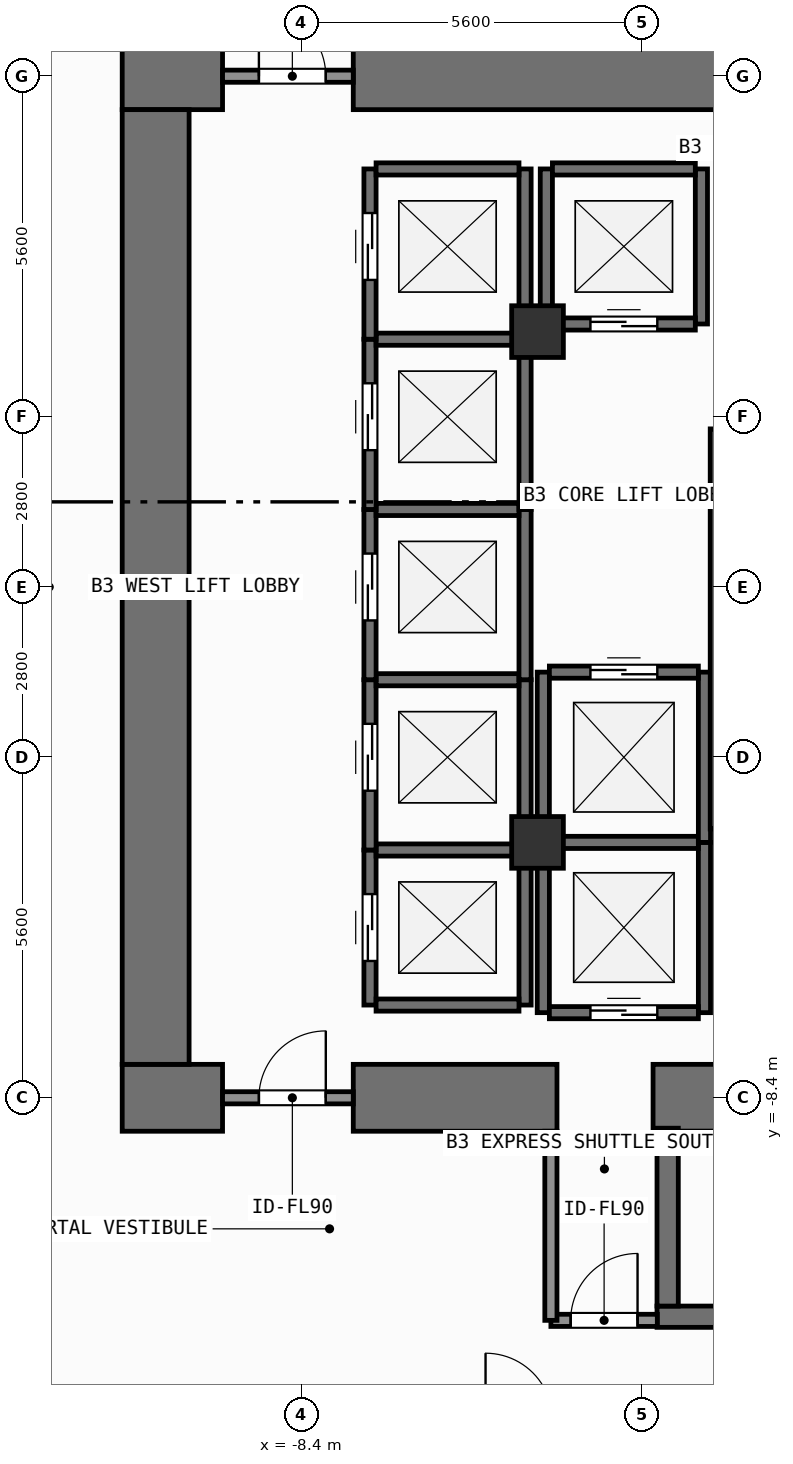
"""IFC4 building model, lengths in metres.
Left out: names, types, materials, properties, quantities, classifications, styles, units other than length and angle.
Written with IfcOpenShell. Run it as: python <this file> out.ifc"""

import sys

from ifc_helpers import new_model, si_unit, direction, frame, frame_2d, origin, origin_2d, place, context, subcontext, project, spatial, rectangle, extrude, element, fill, save


model = new_model("IFC4")
c1 = context("Model", 3, precision=1e-05, world=origin(), true_north=direction((0.0, 1.0)))
c2 = subcontext(c1, "Body", "Model", "MODEL_VIEW")
j1 = project(units=[si_unit("LENGTHUNIT", "METRE"), si_unit("PLANEANGLEUNIT", "RADIAN")], contexts=[c1])
p1 = place(None, origin())
s1 = spatial("IfcSite", under=j1, at=p1, CompositionType="ELEMENT")
p2 = place(p1, origin())
s2 = spatial("IfcBuilding", under=s1, at=p2, CompositionType="ELEMENT")
p3 = place(p2, frame((0.0, 0.0, -12.6)))
s3 = spatial("IfcBuildingStorey", under=s2, at=p3, CompositionType="ELEMENT", Elevation=-12.6)
p4 = place(p3, frame((-11.35, -8.4, 0.0), z_axis=(0.0, 0.0, 1.0), x_axis=(1.0, 0.0, 0.0)))
e1 = element("IfcWall", 1, at=p4, inside=s3, PredefinedType="SHEAR", context=c2, shape_type="SweptSolid", body=[
    extrude(rectangle(XDim=1.65, YDim=1.1, at=frame_2d((0.825, 0.0))), origin(), (0.0, 0.0, 1.0), 4.2),
])
p5 = place(p3, frame((-7.55, -8.4, 0.0), z_axis=(0.0, 0.0, 1.0), x_axis=(1.0, 0.0, 0.0)))
e2 = element("IfcWall", 2, at=p5, inside=s3, PredefinedType="SHEAR", context=c2, shape_type="SweptSolid", body=[
    extrude(rectangle(XDim=3.35, YDim=1.1, at=frame_2d((1.675, 0.0))), origin(), (0.0, 0.0, 1.0), 4.2),
])
p6 = place(p3, frame((-2.62, -8.4, 0.0), z_axis=(0.0, 0.0, 1.0), x_axis=(1.0, 0.0, 0.0)))
e3 = element("IfcWall", 3, at=p6, inside=s3, PredefinedType="SHEAR", context=c2, shape_type="SweptSolid", body=[
    extrude(rectangle(XDim=7.27, YDim=1.1, at=frame_2d((3.635, 0.0))), origin(), (0.0, 0.0, 1.0), 4.2),
])
p7 = place(p3, frame((-11.35, 8.4, 0.0), z_axis=(0.0, 0.0, 1.0), x_axis=(1.0, 0.0, 0.0)))
e4 = element("IfcWall", 4, at=p7, inside=s3, PredefinedType="SHEAR", context=c2, shape_type="SweptSolid", body=[
    extrude(rectangle(XDim=1.65, YDim=1.1, at=frame_2d((0.825, 0.0))), origin(), (0.0, 0.0, 1.0), 4.2),
])
p8 = place(p3, frame((-7.55, 8.4, 0.0), z_axis=(0.0, 0.0, 1.0), x_axis=(1.0, 0.0, 0.0)))
e5 = element("IfcWall", 5, at=p8, inside=s3, PredefinedType="SHEAR", context=c2, shape_type="SweptSolid", body=[
    extrude(rectangle(XDim=16.5, YDim=1.1, at=frame_2d((8.25, 0.0))), origin(), (0.0, 0.0, 1.0), 4.2),
])
p9 = place(p3, frame((-10.8, -7.85, 0.0), z_axis=(0.0, 0.0, 1.0), x_axis=(0.0, 1.0, 0.0)))
e6 = element("IfcWall", 6, at=p9, inside=s3, PredefinedType="SHEAR", context=c2, shape_type="SweptSolid", body=[
    extrude(rectangle(XDim=15.7, YDim=1.1, at=frame_2d((7.85, 0.0))), origin(), (0.0, 0.0, 1.0), 4.2),
])
p10 = place(p3, frame((-2.555, -12.0, 0.0), z_axis=(0.0, 0.0, 1.0), x_axis=(1.0, 0.0, 0.0)))
e7 = element("IfcWall", 7, at=p10, inside=s3, PredefinedType="SHEAR", context=c2, shape_type="SweptSolid", body=[
    extrude(rectangle(XDim=7.31, YDim=0.35, at=frame_2d((3.655, 0.0))), origin(), (0.0, 0.0, 1.0), 4.2),
])
p11 = place(p3, frame((-2.2, -8.988, 0.0), z_axis=(0.0, 0.0, 1.0), x_axis=(1.0, 0.0, 0.0)))
e8 = element("IfcWall", 8, at=p11, inside=s3, PredefinedType="SHEAR", context=c2, shape_type="SweptSolid", body=[
    extrude(rectangle(XDim=6.6, YDim=0.075, at=frame_2d((3.3, 0.0))), origin(), (0.0, 0.0, 1.0), 4.2),
])
p12 = place(p3, frame((-2.38, -11.825, 0.0), z_axis=(0.0, 0.0, 1.0), x_axis=(0.0, 1.0, 0.0)))
e9 = element("IfcWall", 9, at=p12, inside=s3, PredefinedType="SHEAR", context=c2, shape_type="SweptSolid", body=[
    extrude(rectangle(XDim=2.925, YDim=0.35, at=frame_2d((1.462, 0.0))), origin(), (0.0, 0.0, 1.0), 4.2),
])
for number, where, z_axis, x_axis in (
    (10, (-4.52, -4.2, 0.0), (0.0, 0.0, 1.0), (1.0, 0.0, 0.0)),
    (11, (-4.52, 4.2, 0.0), (0.0, 0.0, 1.0), (1.0, 0.0, 0.0)),
):
    element("IfcColumn", number, at=place(p3, frame(where, z_axis=z_axis, x_axis=x_axis)), inside=s3, PredefinedType="COLUMN", context=c2, shape_type="SweptSolid", body=[
        extrude(rectangle(XDim=0.85, YDim=0.85, at=origin_2d()), origin(), (0.0, 0.0, 1.0), 4.2),
    ])
p13 = place(p3, frame((-7.275, -6.875, 0.0), z_axis=(0.0, 0.0, 1.0), x_axis=(0.0, 1.0, 0.0)))
e12 = element("IfcWall", 12, at=p13, inside=s3, PredefinedType="SHEAR", context=c2, shape_type="SweptSolid", body=[
    extrude(rectangle(XDim=2.55, YDim=0.2, at=frame_2d((1.275, 0.0))), origin(), (0.0, 0.0, 1.0), 3.94),
])
p14 = place(p13, frame((0.725, 0.0, 0.0)))
e13 = element("IfcOpeningElement", 13, at=p14, cuts=e12, PredefinedType="OPENING", context=c2, shape_type="SweptSolid", body=[
    extrude(rectangle(XDim=1.1, YDim=2.2, at=frame_2d((0.55, 1.1))), frame((0.0, 0.11, 0.0), z_axis=(0.0, -1.0, 0.0), x_axis=(1.0, 0.0, 0.0)), (0.0, 0.0, 1.0), 0.22),
])
p15 = place(p3, frame((-4.725, -6.875, 0.0), z_axis=(0.0, 0.0, 1.0), x_axis=(0.0, 1.0, 0.0)))
e14 = element("IfcWall", 14, at=p15, inside=s3, PredefinedType="SHEAR", context=c2, shape_type="SweptSolid", body=[
    extrude(rectangle(XDim=2.55, YDim=0.2, at=frame_2d((1.275, 0.0))), origin(), (0.0, 0.0, 1.0), 3.94),
])
for number, where, z_axis, x_axis in (
    (15, (-7.175, -6.875, 0.0), (0.0, 0.0, 1.0), (1.0, 0.0, 0.0)),
    (16, (-7.175, -4.325, 0.0), (0.0, 0.0, 1.0), (1.0, 0.0, 0.0)),
):
    element("IfcWall", number, at=place(p3, frame(where, z_axis=z_axis, x_axis=x_axis)), inside=s3, PredefinedType="SHEAR", context=c2, shape_type="SweptSolid", body=[
        extrude(rectangle(XDim=2.35, YDim=0.2, at=frame_2d((1.175, 0.0))), origin(), (0.0, 0.0, 1.0), 3.94),
    ])
p16 = place(p3, frame((-7.275, -4.325, 0.0), z_axis=(0.0, 0.0, 1.0), x_axis=(0.0, 1.0, 0.0)))
e17 = element("IfcWall", 17, at=p16, inside=s3, PredefinedType="SHEAR", context=c2, shape_type="SweptSolid", body=[
    extrude(rectangle(XDim=2.8, YDim=0.2, at=frame_2d((1.4, 0.0))), origin(), (0.0, 0.0, 1.0), 3.94),
])
p17 = place(p16, frame((0.975, 0.0, 0.0)))
e18 = element("IfcOpeningElement", 18, at=p17, cuts=e17, PredefinedType="OPENING", context=c2, shape_type="SweptSolid", body=[
    extrude(rectangle(XDim=1.1, YDim=2.2, at=frame_2d((0.55, 1.1))), frame((0.0, 0.11, 0.0), z_axis=(0.0, -1.0, 0.0), x_axis=(1.0, 0.0, 0.0)), (0.0, 0.0, 1.0), 0.22),
])
p18 = place(p3, frame((-4.725, -4.325, 0.0), z_axis=(0.0, 0.0, 1.0), x_axis=(0.0, 1.0, 0.0)))
e19 = element("IfcWall", 19, at=p18, inside=s3, PredefinedType="SHEAR", context=c2, shape_type="SweptSolid", body=[
    extrude(rectangle(XDim=2.8, YDim=0.2, at=frame_2d((1.4, 0.0))), origin(), (0.0, 0.0, 1.0), 3.94),
])
p19 = place(p3, frame((-7.175, -1.525, 0.0), z_axis=(0.0, 0.0, 1.0), x_axis=(1.0, 0.0, 0.0)))
e20 = element("IfcWall", 20, at=p19, inside=s3, PredefinedType="SHEAR", context=c2, shape_type="SweptSolid", body=[
    extrude(rectangle(XDim=2.35, YDim=0.2, at=frame_2d((1.175, 0.0))), origin(), (0.0, 0.0, 1.0), 3.94),
])
p20 = place(p3, frame((-7.275, -1.525, 0.0), z_axis=(0.0, 0.0, 1.0), x_axis=(0.0, 1.0, 0.0)))
e21 = element("IfcWall", 21, at=p20, inside=s3, PredefinedType="SHEAR", context=c2, shape_type="SweptSolid", body=[
    extrude(rectangle(XDim=2.8, YDim=0.2, at=frame_2d((1.4, 0.0))), origin(), (0.0, 0.0, 1.0), 3.94),
])
p21 = place(p20, frame((0.975, 0.0, 0.0)))
e22 = element("IfcOpeningElement", 22, at=p21, cuts=e21, PredefinedType="OPENING", context=c2, shape_type="SweptSolid", body=[
    extrude(rectangle(XDim=1.1, YDim=2.2, at=frame_2d((0.55, 1.1))), frame((0.0, 0.11, 0.0), z_axis=(0.0, -1.0, 0.0), x_axis=(1.0, 0.0, 0.0)), (0.0, 0.0, 1.0), 0.22),
])
p22 = place(p3, frame((-4.725, -1.525, 0.0), z_axis=(0.0, 0.0, 1.0), x_axis=(0.0, 1.0, 0.0)))
e23 = element("IfcWall", 23, at=p22, inside=s3, PredefinedType="SHEAR", context=c2, shape_type="SweptSolid", body=[
    extrude(rectangle(XDim=2.8, YDim=0.2, at=frame_2d((1.4, 0.0))), origin(), (0.0, 0.0, 1.0), 3.94),
])
p23 = place(p3, frame((-7.175, 1.275, 0.0), z_axis=(0.0, 0.0, 1.0), x_axis=(1.0, 0.0, 0.0)))
e24 = element("IfcWall", 24, at=p23, inside=s3, PredefinedType="SHEAR", context=c2, shape_type="SweptSolid", body=[
    extrude(rectangle(XDim=2.35, YDim=0.2, at=frame_2d((1.175, 0.0))), origin(), (0.0, 0.0, 1.0), 3.94),
])
p24 = place(p3, frame((-7.275, 1.275, 0.0), z_axis=(0.0, 0.0, 1.0), x_axis=(0.0, 1.0, 0.0)))
e25 = element("IfcWall", 25, at=p24, inside=s3, PredefinedType="SHEAR", context=c2, shape_type="SweptSolid", body=[
    extrude(rectangle(XDim=2.8, YDim=0.2, at=frame_2d((1.4, 0.0))), origin(), (0.0, 0.0, 1.0), 3.94),
])
p25 = place(p24, frame((0.975, 0.0, 0.0)))
e26 = element("IfcOpeningElement", 26, at=p25, cuts=e25, PredefinedType="OPENING", context=c2, shape_type="SweptSolid", body=[
    extrude(rectangle(XDim=1.1, YDim=2.2, at=frame_2d((0.55, 1.1))), frame((0.0, 0.11, 0.0), z_axis=(0.0, -1.0, 0.0), x_axis=(1.0, 0.0, 0.0)), (0.0, 0.0, 1.0), 0.22),
])
p26 = place(p3, frame((-4.725, 1.275, 0.0), z_axis=(0.0, 0.0, 1.0), x_axis=(0.0, 1.0, 0.0)))
e27 = element("IfcWall", 27, at=p26, inside=s3, PredefinedType="SHEAR", context=c2, shape_type="SweptSolid", body=[
    extrude(rectangle(XDim=2.8, YDim=0.2, at=frame_2d((1.4, 0.0))), origin(), (0.0, 0.0, 1.0), 3.94),
])
p27 = place(p3, frame((-7.175, 4.075, 0.0), z_axis=(0.0, 0.0, 1.0), x_axis=(1.0, 0.0, 0.0)))
e28 = element("IfcWall", 28, at=p27, inside=s3, PredefinedType="SHEAR", context=c2, shape_type="SweptSolid", body=[
    extrude(rectangle(XDim=2.35, YDim=0.2, at=frame_2d((1.175, 0.0))), origin(), (0.0, 0.0, 1.0), 3.94),
])
p28 = place(p3, frame((-7.275, 4.075, 0.0), z_axis=(0.0, 0.0, 1.0), x_axis=(0.0, 1.0, 0.0)))
e29 = element("IfcWall", 29, at=p28, inside=s3, PredefinedType="SHEAR", context=c2, shape_type="SweptSolid", body=[
    extrude(rectangle(XDim=2.8, YDim=0.2, at=frame_2d((1.4, 0.0))), origin(), (0.0, 0.0, 1.0), 3.94),
])
p29 = place(p28, frame((0.975, 0.0, 0.0)))
e30 = element("IfcOpeningElement", 30, at=p29, cuts=e29, PredefinedType="OPENING", context=c2, shape_type="SweptSolid", body=[
    extrude(rectangle(XDim=1.1, YDim=2.2, at=frame_2d((0.55, 1.1))), frame((0.0, 0.11, 0.0), z_axis=(0.0, -1.0, 0.0), x_axis=(1.0, 0.0, 0.0)), (0.0, 0.0, 1.0), 0.22),
])
p30 = place(p3, frame((-4.725, 4.075, 0.0), z_axis=(0.0, 0.0, 1.0), x_axis=(0.0, 1.0, 0.0)))
e31 = element("IfcWall", 31, at=p30, inside=s3, PredefinedType="SHEAR", context=c2, shape_type="SweptSolid", body=[
    extrude(rectangle(XDim=2.8, YDim=0.2, at=frame_2d((1.4, 0.0))), origin(), (0.0, 0.0, 1.0), 3.94),
])
p31 = place(p3, frame((-7.175, 6.875, 0.0), z_axis=(0.0, 0.0, 1.0), x_axis=(1.0, 0.0, 0.0)))
e32 = element("IfcWall", 32, at=p31, inside=s3, PredefinedType="SHEAR", context=c2, shape_type="SweptSolid", body=[
    extrude(rectangle(XDim=2.35, YDim=0.2, at=frame_2d((1.175, 0.0))), origin(), (0.0, 0.0, 1.0), 3.94),
])
for number, where, z_axis, x_axis in (
    (33, (-4.375, 4.325, 0.0), (0.0, 0.0, 1.0), (0.0, 1.0, 0.0)),
    (34, (-1.825, 4.325, 0.0), (0.0, 0.0, 1.0), (0.0, 1.0, 0.0)),
):
    element("IfcWall", number, at=place(p3, frame(where, z_axis=z_axis, x_axis=x_axis)), inside=s3, PredefinedType="SHEAR", context=c2, shape_type="SweptSolid", body=[
        extrude(rectangle(XDim=2.55, YDim=0.2, at=frame_2d((1.275, 0.0))), origin(), (0.0, 0.0, 1.0), 3.94),
    ])
p32 = place(p3, frame((-4.275, 4.325, 0.0), z_axis=(0.0, 0.0, 1.0), x_axis=(1.0, 0.0, 0.0)))
e35 = element("IfcWall", 35, at=p32, inside=s3, PredefinedType="SHEAR", context=c2, shape_type="SweptSolid", body=[
    extrude(rectangle(XDim=2.35, YDim=0.2, at=frame_2d((1.175, 0.0))), origin(), (0.0, 0.0, 1.0), 3.94),
])
p33 = place(p32, frame((0.625, 0.0, 0.0)))
e36 = element("IfcOpeningElement", 36, at=p33, cuts=e35, PredefinedType="OPENING", context=c2, shape_type="SweptSolid", body=[
    extrude(rectangle(XDim=1.1, YDim=2.2, at=frame_2d((0.55, 1.1))), frame((0.0, 0.11, 0.0), z_axis=(0.0, -1.0, 0.0), x_axis=(1.0, 0.0, 0.0)), (0.0, 0.0, 1.0), 0.22),
])
p34 = place(p3, frame((-4.275, 6.875, 0.0), z_axis=(0.0, 0.0, 1.0), x_axis=(1.0, 0.0, 0.0)))
e37 = element("IfcWall", 37, at=p34, inside=s3, PredefinedType="SHEAR", context=c2, shape_type="SweptSolid", body=[
    extrude(rectangle(XDim=2.35, YDim=0.2, at=frame_2d((1.175, 0.0))), origin(), (0.0, 0.0, 1.0), 3.94),
])
for number, where, z_axis, x_axis in (
    (38, (-4.425, -7.0, 0.0), (0.0, 0.0, 1.0), (0.0, 1.0, 0.0)),
    (39, (-1.775, -7.0, 0.0), (0.0, 0.0, 1.0), (0.0, 1.0, 0.0)),
):
    element("IfcWall", number, at=place(p3, frame(where, z_axis=z_axis, x_axis=x_axis)), inside=s3, PredefinedType="SHEAR", context=c2, shape_type="SweptSolid", body=[
        extrude(rectangle(XDim=2.8, YDim=0.2, at=frame_2d((1.4, 0.0))), origin(), (0.0, 0.0, 1.0), 3.94),
    ])
p35 = place(p3, frame((-4.325, -7.0, 0.0), z_axis=(0.0, 0.0, 1.0), x_axis=(1.0, 0.0, 0.0)))
e40 = element("IfcWall", 40, at=p35, inside=s3, PredefinedType="SHEAR", context=c2, shape_type="SweptSolid", body=[
    extrude(rectangle(XDim=2.45, YDim=0.2, at=frame_2d((1.225, 0.0))), origin(), (0.0, 0.0, 1.0), 3.94),
])
p36 = place(p35, frame((0.675, 0.0, 0.0)))
e41 = element("IfcOpeningElement", 41, at=p36, cuts=e40, PredefinedType="OPENING", context=c2, shape_type="SweptSolid", body=[
    extrude(rectangle(XDim=1.1, YDim=2.2, at=frame_2d((0.55, 1.1))), frame((0.0, 0.11, 0.0), z_axis=(0.0, -1.0, 0.0), x_axis=(1.0, 0.0, 0.0)), (0.0, 0.0, 1.0), 0.22),
])
p37 = place(p3, frame((-4.325, -4.2, 0.0), z_axis=(0.0, 0.0, 1.0), x_axis=(1.0, 0.0, 0.0)))
e42 = element("IfcWall", 42, at=p37, inside=s3, PredefinedType="SHEAR", context=c2, shape_type="SweptSolid", body=[
    extrude(rectangle(XDim=2.45, YDim=0.2, at=frame_2d((1.225, 0.0))), origin(), (0.0, 0.0, 1.0), 3.94),
])
for number, where, z_axis, x_axis in (
    (43, (-4.425, -4.2, 0.0), (0.0, 0.0, 1.0), (0.0, 1.0, 0.0)),
    (44, (-1.775, -4.2, 0.0), (0.0, 0.0, 1.0), (0.0, 1.0, 0.0)),
):
    element("IfcWall", number, at=place(p3, frame(where, z_axis=z_axis, x_axis=x_axis)), inside=s3, PredefinedType="SHEAR", context=c2, shape_type="SweptSolid", body=[
        extrude(rectangle(XDim=2.8, YDim=0.2, at=frame_2d((1.4, 0.0))), origin(), (0.0, 0.0, 1.0), 3.94),
    ])
p38 = place(p3, frame((-4.325, -1.4, 0.0), z_axis=(0.0, 0.0, 1.0), x_axis=(1.0, 0.0, 0.0)))
e45 = element("IfcWall", 45, at=p38, inside=s3, PredefinedType="SHEAR", context=c2, shape_type="SweptSolid", body=[
    extrude(rectangle(XDim=2.45, YDim=0.2, at=frame_2d((1.225, 0.0))), origin(), (0.0, 0.0, 1.0), 3.94),
])
p39 = place(p38, frame((0.675, 0.0, 0.0)))
e46 = element("IfcOpeningElement", 46, at=p39, cuts=e45, PredefinedType="OPENING", context=c2, shape_type="SweptSolid", body=[
    extrude(rectangle(XDim=1.1, YDim=2.2, at=frame_2d((0.55, 1.1))), frame((0.0, 0.11, 0.0), z_axis=(0.0, -1.0, 0.0), x_axis=(1.0, 0.0, 0.0)), (0.0, 0.0, 1.0), 0.22),
])
p40 = place(p3, frame((-9.7, -8.4, 0.0), z_axis=(0.0, 0.0, 1.0), x_axis=(1.0, 0.0, 0.0)))
e47 = element("IfcWall", 47, at=p40, inside=s3, PredefinedType="SOLIDWALL", context=c2, shape_type="SweptSolid", body=[
    extrude(rectangle(XDim=2.15, YDim=0.2, at=frame_2d((1.075, 0.0))), origin(), (0.0, 0.0, 1.0), 2.98),
])
p41 = place(p40, frame((0.598, 0.0, 0.0)))
e48 = element("IfcOpeningElement", 48, at=p41, cuts=e47, PredefinedType="OPENING", context=c2, shape_type="SweptSolid", body=[
    extrude(rectangle(XDim=1.1, YDim=2.15, at=frame_2d((0.55, 1.075))), frame((0.0, 0.11, 0.0), z_axis=(0.0, -1.0, 0.0), x_axis=(1.0, 0.0, 0.0)), (0.0, 0.0, 1.0), 0.22),
])
p42 = place(p3, frame((-9.7, 8.4, 0.0), z_axis=(0.0, 0.0, 1.0), x_axis=(1.0, 0.0, 0.0)))
e49 = element("IfcWall", 49, at=p42, inside=s3, PredefinedType="SOLIDWALL", context=c2, shape_type="SweptSolid", body=[
    extrude(rectangle(XDim=2.15, YDim=0.2, at=frame_2d((1.075, 0.0))), origin(), (0.0, 0.0, 1.0), 2.98),
])
p43 = place(p42, frame((0.598, 0.0, 0.0)))
e50 = element("IfcOpeningElement", 50, at=p43, cuts=e49, PredefinedType="OPENING", context=c2, shape_type="SweptSolid", body=[
    extrude(rectangle(XDim=1.1, YDim=2.15, at=frame_2d((0.55, 1.075))), frame((0.0, 0.11, 0.0), z_axis=(0.0, -1.0, 0.0), x_axis=(1.0, 0.0, 0.0)), (0.0, 0.0, 1.0), 0.22),
])
p44 = place(p3, frame((-4.3, -12.06, 0.0), z_axis=(0.0, 0.0, 1.0), x_axis=(1.0, 0.0, 0.0)))
e51 = element("IfcWall", 51, at=p44, inside=s3, PredefinedType="SOLIDWALL", context=c2, shape_type="SweptSolid", body=[
    extrude(rectangle(XDim=1.75, YDim=0.2, at=frame_2d((0.875, 0.0))), origin(), (0.0, 0.0, 1.0), 3.94),
])
p45 = place(p44, frame((0.325, 0.0, 0.0)))
e52 = element("IfcOpeningElement", 52, at=p45, cuts=e51, PredefinedType="OPENING", context=c2, shape_type="SweptSolid", body=[
    extrude(rectangle(XDim=1.1, YDim=2.15, at=frame_2d((0.55, 1.075))), frame((0.0, 0.11, 0.0), z_axis=(0.0, -1.0, 0.0), x_axis=(1.0, 0.0, 0.0)), (0.0, 0.0, 1.0), 0.22),
])
p46 = place(p3, frame((-4.3, -12.06, 0.0), z_axis=(0.0, 0.0, 1.0), x_axis=(0.0, 1.0, 0.0)))
e53 = element("IfcWall", 53, at=p46, inside=s3, PredefinedType="SOLIDWALL", context=c2, shape_type="SweptSolid", body=[
    extrude(rectangle(XDim=3.11, YDim=0.2, at=frame_2d((1.555, 0.0))), origin(), (0.0, 0.0, 1.0), 3.94),
])
p47 = place(p3, frame((-1.58, -3.98, 0.0), z_axis=(0.0, 0.0, 1.0), x_axis=(0.0, 1.0, 0.0)))
e54 = element("IfcWall", 54, at=p47, inside=s3, PredefinedType="SOLIDWALL", context=c2, shape_type="SweptSolid", body=[
    extrude(rectangle(XDim=6.58, YDim=0.2, at=frame_2d((3.29, 0.0))), origin(), (0.0, 0.0, 1.0), 3.94),
])
p48 = place(p14, origin())
e55 = element("IfcDoor", 55, at=p48, inside=s3, OperationType="SLIDING_TO_LEFT", PredefinedType="DOOR", context=c2, shape_type="SweptSolid", body=[
    extrude(rectangle(XDim=1.1, YDim=2.2, at=frame_2d((0.55, 1.1))), frame((0.0, 0.025, 0.0), z_axis=(0.0, -1.0, 0.0), x_axis=(1.0, 0.0, 0.0)), (0.0, 0.0, 1.0), 0.05),
])
fill(e13, e55)
p49 = place(p17, origin())
e56 = element("IfcDoor", 56, at=p49, inside=s3, OperationType="SLIDING_TO_LEFT", PredefinedType="DOOR", context=c2, shape_type="SweptSolid", body=[
    extrude(rectangle(XDim=1.1, YDim=2.2, at=frame_2d((0.55, 1.1))), frame((0.0, 0.025, 0.0), z_axis=(0.0, -1.0, 0.0), x_axis=(1.0, 0.0, 0.0)), (0.0, 0.0, 1.0), 0.05),
])
fill(e18, e56)
p50 = place(p21, origin())
e57 = element("IfcDoor", 57, at=p50, inside=s3, OperationType="SLIDING_TO_LEFT", PredefinedType="DOOR", context=c2, shape_type="SweptSolid", body=[
    extrude(rectangle(XDim=1.1, YDim=2.2, at=frame_2d((0.55, 1.1))), frame((0.0, 0.025, 0.0), z_axis=(0.0, -1.0, 0.0), x_axis=(1.0, 0.0, 0.0)), (0.0, 0.0, 1.0), 0.05),
])
fill(e22, e57)
p51 = place(p25, origin())
e58 = element("IfcDoor", 58, at=p51, inside=s3, OperationType="SLIDING_TO_LEFT", PredefinedType="DOOR", context=c2, shape_type="SweptSolid", body=[
    extrude(rectangle(XDim=1.1, YDim=2.2, at=frame_2d((0.55, 1.1))), frame((0.0, 0.025, 0.0), z_axis=(0.0, -1.0, 0.0), x_axis=(1.0, 0.0, 0.0)), (0.0, 0.0, 1.0), 0.05),
])
fill(e26, e58)
p52 = place(p29, origin())
e59 = element("IfcDoor", 59, at=p52, inside=s3, OperationType="SLIDING_TO_LEFT", PredefinedType="DOOR", context=c2, shape_type="SweptSolid", body=[
    extrude(rectangle(XDim=1.1, YDim=2.2, at=frame_2d((0.55, 1.1))), frame((0.0, 0.025, 0.0), z_axis=(0.0, -1.0, 0.0), x_axis=(1.0, 0.0, 0.0)), (0.0, 0.0, 1.0), 0.05),
])
fill(e30, e59)
p53 = place(p33, origin())
e60 = element("IfcDoor", 60, at=p53, inside=s3, OperationType="SLIDING_TO_LEFT", PredefinedType="DOOR", context=c2, shape_type="SweptSolid", body=[
    extrude(rectangle(XDim=1.1, YDim=2.2, at=frame_2d((0.55, 1.1))), frame((0.0, 0.025, 0.0), z_axis=(0.0, -1.0, 0.0), x_axis=(1.0, 0.0, 0.0)), (0.0, 0.0, 1.0), 0.05),
])
fill(e36, e60)
p54 = place(p36, origin())
e61 = element("IfcDoor", 61, at=p54, inside=s3, OperationType="SLIDING_TO_LEFT", PredefinedType="DOOR", context=c2, shape_type="SweptSolid", body=[
    extrude(rectangle(XDim=1.1, YDim=2.2, at=frame_2d((0.55, 1.1))), frame((0.0, 0.025, 0.0), z_axis=(0.0, -1.0, 0.0), x_axis=(1.0, 0.0, 0.0)), (0.0, 0.0, 1.0), 0.05),
])
fill(e41, e61)
p55 = place(p39, origin())
e62 = element("IfcDoor", 62, at=p55, inside=s3, OperationType="SLIDING_TO_LEFT", PredefinedType="DOOR", context=c2, shape_type="SweptSolid", body=[
    extrude(rectangle(XDim=1.1, YDim=2.2, at=frame_2d((0.55, 1.1))), frame((0.0, 0.025, 0.0), z_axis=(0.0, -1.0, 0.0), x_axis=(1.0, 0.0, 0.0)), (0.0, 0.0, 1.0), 0.05),
])
fill(e46, e62)
p56 = place(p41, origin())
e63 = element("IfcDoor", 63, at=p56, inside=s3, OperationType="SINGLE_SWING_RIGHT", PredefinedType="DOOR", context=c2, shape_type="SweptSolid", body=[
    extrude(rectangle(XDim=1.1, YDim=2.15, at=frame_2d((0.55, 1.075))), frame((0.0, 0.025, 0.0), z_axis=(0.0, -1.0, 0.0), x_axis=(1.0, 0.0, 0.0)), (0.0, 0.0, 1.0), 0.05),
])
fill(e48, e63)
p57 = place(p43, origin())
e64 = element("IfcDoor", 64, at=p57, inside=s3, OperationType="SINGLE_SWING_LEFT", PredefinedType="DOOR", context=c2, shape_type="SweptSolid", body=[
    extrude(rectangle(XDim=1.1, YDim=2.15, at=frame_2d((0.55, 1.075))), frame((0.0, 0.025, 0.0), z_axis=(0.0, -1.0, 0.0), x_axis=(1.0, 0.0, 0.0)), (0.0, 0.0, 1.0), 0.05),
])
fill(e50, e64)
p58 = place(p45, origin())
e65 = element("IfcDoor", 65, at=p58, inside=s3, OperationType="SINGLE_SWING_RIGHT", PredefinedType="DOOR", context=c2, shape_type="SweptSolid", body=[
    extrude(rectangle(XDim=1.1, YDim=2.15, at=frame_2d((0.55, 1.075))), frame((0.0, 0.025, 0.0), z_axis=(0.0, -1.0, 0.0), x_axis=(1.0, 0.0, 0.0)), (0.0, 0.0, 1.0), 0.05),
])
fill(e52, e65)
save(model, sys.argv[1])
